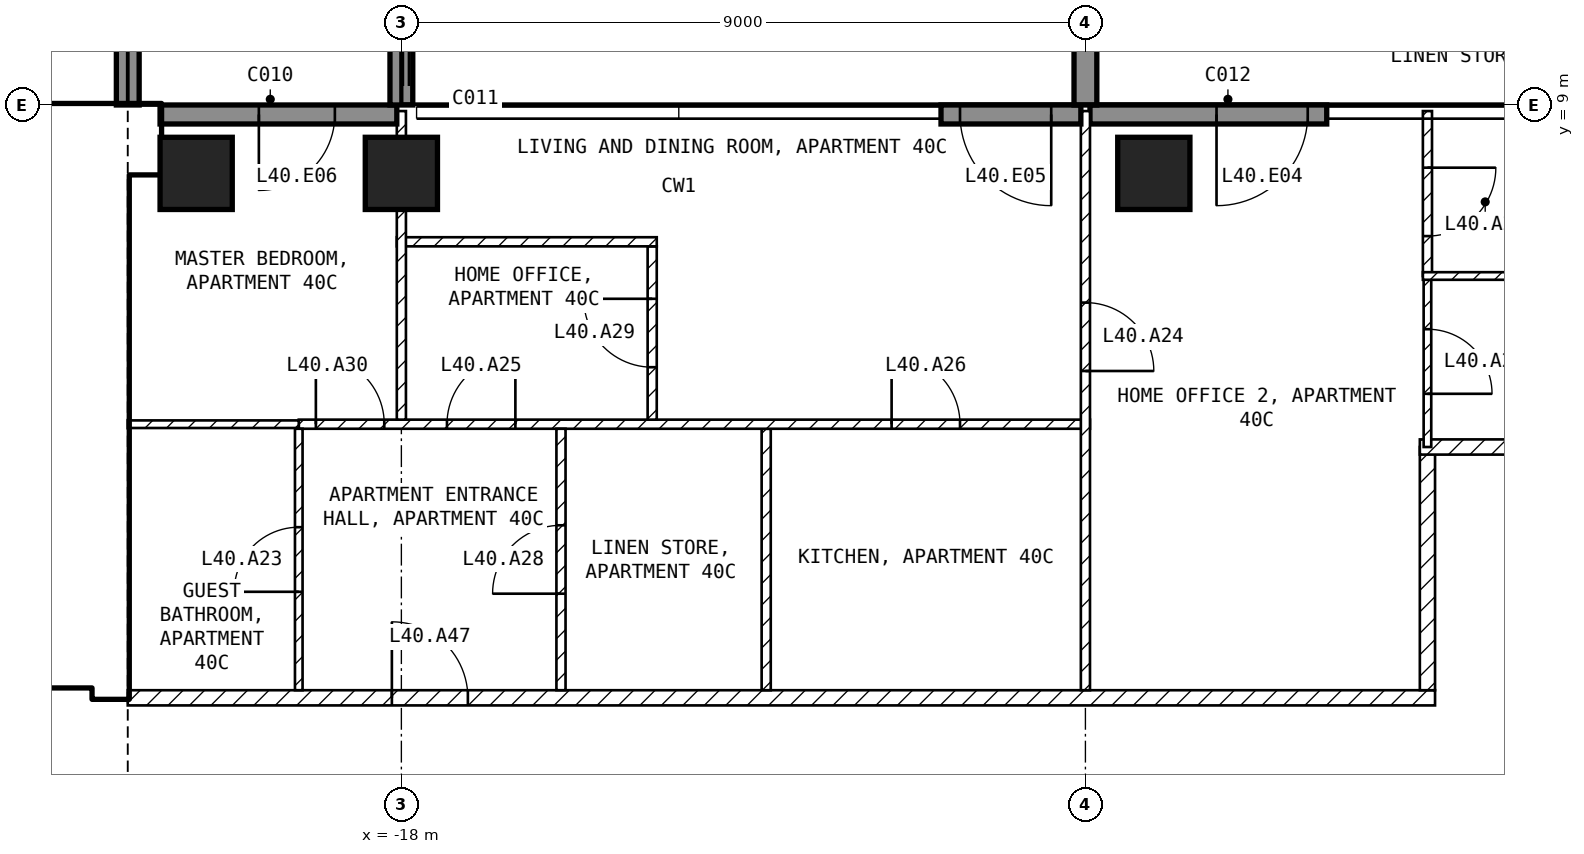
"""IFC4 building model, lengths in metres.
Left out: names, types, materials, properties, quantities, classifications, styles, units other than length and angle.
Written with IfcOpenShell. Run it as: python <this file> out.ifc"""

import sys

from ifc_helpers import new_model, si_unit, direction, frame, frame_2d, origin, origin_2d, place, context, subcontext, project, spatial, rectangle, extrude, element, fill, save


model = new_model("IFC4")
c1 = context("Model", 3, precision=1e-05, world=origin(), true_north=direction((0.0, 1.0)))
c2 = subcontext(c1, "Body", "Model", "MODEL_VIEW")
j1 = project(units=[si_unit("LENGTHUNIT", "METRE"), si_unit("PLANEANGLEUNIT", "RADIAN")], contexts=[c1])
p1 = place(None, origin())
s1 = spatial("IfcSite", under=j1, at=p1, CompositionType="ELEMENT")
p2 = place(p1, origin())
s2 = spatial("IfcBuilding", under=s1, at=p2, CompositionType="ELEMENT")
p3 = place(p2, frame((0.0, 0.0, 166.6)))
s3 = spatial("IfcBuildingStorey", under=s2, at=p3, CompositionType="ELEMENT", Elevation=166.6)
for number, where, z_axis, x_axis in (
    (1, (-20.7, 8.1, -0.25), (0.0, 0.0, 1.0), (1.0, 0.0, 0.0)),
    (2, (-18.0, 8.1, -0.25), (0.0, 0.0, 1.0), (1.0, 0.0, 0.0)),
    (3, (-8.1, 8.1, -0.25), (0.0, 0.0, 1.0), (1.0, 0.0, 0.0)),
):
    element("IfcColumn", number, at=place(p3, frame(where, z_axis=z_axis, x_axis=x_axis)), inside=s3, PredefinedType="COLUMN", context=c2, shape_type="SweptSolid", body=[
        extrude(rectangle(XDim=0.95, YDim=0.95, at=origin_2d()), origin(), (0.0, 0.0, 1.0), 3.5),
    ])
p4 = place(p3, frame((-5.825, 8.875, 0.0), z_axis=(0.0, 0.0, 1.0), x_axis=(-1.0, 0.0, 0.0)))
e4 = element("IfcWall", 4, at=p4, inside=s3, PredefinedType="SOLIDWALL", context=c2, shape_type="SweptSolid", body=[
    extrude(rectangle(XDim=3.115, YDim=0.25, at=frame_2d((1.558, 0.0))), origin(), (0.0, 0.0, 1.0), 3.25),
])
p5 = place(p4, frame((0.25, 0.0, 0.0)))
e5 = element("IfcOpeningElement", 5, at=p5, cuts=e4, PredefinedType="OPENING", context=c2, shape_type="SweptSolid", body=[
    extrude(rectangle(XDim=1.2, YDim=2.4, at=frame_2d((0.6, 1.2))), frame((0.0, 0.135, 0.0), z_axis=(0.0, -1.0, 0.0), x_axis=(1.0, 0.0, 0.0)), (0.0, 0.0, 1.0), 0.27),
])
p6 = place(p3, frame((-9.06, 8.875, 0.0), z_axis=(0.0, 0.0, 1.0), x_axis=(-1.0, 0.0, 0.0)))
e6 = element("IfcWall", 6, at=p6, inside=s3, PredefinedType="SOLIDWALL", context=c2, shape_type="SweptSolid", body=[
    extrude(rectangle(XDim=1.84, YDim=0.25, at=frame_2d((0.92, 0.0))), origin(), (0.0, 0.0, 1.0), 3.25),
])
p7 = place(p6, frame((0.39, 0.0, 0.0)))
e7 = element("IfcOpeningElement", 7, at=p7, cuts=e6, PredefinedType="OPENING", context=c2, shape_type="SweptSolid", body=[
    extrude(rectangle(XDim=1.2, YDim=2.4, at=frame_2d((0.6, 1.2))), frame((0.0, 0.135, 0.0), z_axis=(0.0, -1.0, 0.0), x_axis=(1.0, 0.0, 0.0)), (0.0, 0.0, 1.0), 0.27),
])
p8 = place(p3, frame((-18.06, 8.875, 0.0), z_axis=(0.0, 0.0, 1.0), x_axis=(-1.0, 0.0, 0.0)))
e8 = element("IfcWall", 8, at=p8, inside=s3, PredefinedType="SOLIDWALL", context=c2, shape_type="SweptSolid", body=[
    extrude(rectangle(XDim=3.115, YDim=0.25, at=frame_2d((1.558, 0.0))), origin(), (0.0, 0.0, 1.0), 3.25),
])
p9 = place(p8, frame((0.815, 0.0, 0.0)))
e9 = element("IfcOpeningElement", 9, at=p9, cuts=e8, PredefinedType="OPENING", context=c2, shape_type="SweptSolid", body=[
    extrude(rectangle(XDim=1.0, YDim=2.4, at=frame_2d((0.5, 1.2))), frame((0.0, 0.135, 0.0), z_axis=(0.0, -1.0, 0.0), x_axis=(1.0, 0.0, 0.0)), (0.0, 0.0, 1.0), 0.27),
])
for number, where, z_axis, x_axis in (
    (10, (-21.6, 9.0, 0.0), (0.0, 0.0, 1.0), (0.0, 1.0, 0.0)),
    (11, (-18.0, 9.0, 0.0), (0.0, 0.0, 1.0), (0.0, 1.0, 0.0)),
    (12, (-9.0, 9.0, 0.0), (0.0, 0.0, 1.0), (0.0, 1.0, 0.0)),
):
    element("IfcWall", number, at=place(p3, frame(where, z_axis=z_axis, x_axis=x_axis)), inside=s3, PredefinedType="SOLIDWALL", context=c2, shape_type="SweptSolid", body=[
        extrude(rectangle(XDim=2.7, YDim=0.3, at=frame_2d((1.35, 0.0))), origin(), (0.0, 0.0, 1.0), 3.25),
    ])
p10 = place(p3, frame((-29.6, 8.55, 0.0), z_axis=(0.0, 0.0, 1.0), x_axis=(1.0, 0.0, 0.0)))
e13 = element("IfcWall", 13, at=p10, inside=s3, PredefinedType="SHEAR", context=c2, shape_type="SweptSolid", body=[
    extrude(rectangle(XDim=8.425, YDim=0.9, at=frame_2d((4.212, 0.0))), origin(), (0.0, 0.0, 1.0), 3.25),
])
p11 = place(p3, frame((-21.825, 1.2, 0.0), z_axis=(0.0, 0.0, 1.0), x_axis=(0.0, 1.0, 0.0)))
e14 = element("IfcWall", 14, at=p11, inside=s3, PredefinedType="SHEAR", context=c2, shape_type="SweptSolid", body=[
    extrude(rectangle(XDim=6.9, YDim=0.45, at=frame_2d((3.45, 0.0))), origin(), (0.0, 0.0, 1.0), 3.25),
])
p12 = place(p3, frame((-33.2, 1.45, 0.0), z_axis=(0.0, 0.0, 1.0), x_axis=(1.0, 0.0, 0.0)))
e15 = element("IfcWall", 15, at=p12, inside=s3, PredefinedType="SOLIDWALL", context=c2, shape_type="SweptSolid", body=[
    extrude(rectangle(XDim=11.15, YDim=0.2, at=frame_2d((5.575, 0.0))), origin(), (0.0, 0.0, 1.0), 3.25),
])
p13 = place(p12, frame((9.4, 0.0, 0.0)))
e16 = element("IfcOpeningElement", 16, at=p13, cuts=e15, PredefinedType="OPENING", context=c2, shape_type="SweptSolid", body=[
    extrude(rectangle(XDim=1.0, YDim=2.1, at=frame_2d((0.5, 1.05))), frame((0.0, 0.11, 0.0), z_axis=(0.0, -1.0, 0.0), x_axis=(1.0, 0.0, 0.0)), (0.0, 0.0, 1.0), 0.22),
])
p14 = place(p12, frame((6.9, 0.0, 0.0)))
e17 = element("IfcOpeningElement", 17, at=p14, cuts=e15, PredefinedType="OPENING", context=c2, shape_type="SweptSolid", body=[
    extrude(rectangle(XDim=1.0, YDim=2.1, at=frame_2d((0.5, 1.05))), frame((0.0, 0.11, 0.0), z_axis=(0.0, -1.0, 0.0), x_axis=(1.0, 0.0, 0.0)), (0.0, 0.0, 1.0), 0.22),
])
p15 = place(p12, frame((1.1, 0.0, 0.0)))
e18 = element("IfcOpeningElement", 18, at=p15, cuts=e15, PredefinedType="OPENING", context=c2, shape_type="SweptSolid", body=[
    extrude(rectangle(XDim=0.9, YDim=2.1, at=frame_2d((0.45, 1.05))), frame((0.0, 0.11, 0.0), z_axis=(0.0, -1.0, 0.0), x_axis=(1.0, 0.0, 0.0)), (0.0, 0.0, 1.0), 0.22),
])
p16 = place(p3, frame((-28.35, 5.15, 0.0), z_axis=(0.0, 0.0, 1.0), x_axis=(1.0, 0.0, 0.0)))
e19 = element("IfcWall", 19, at=p16, inside=s3, PredefinedType="SOLIDWALL", context=c2, shape_type="SweptSolid", body=[
    extrude(rectangle(XDim=6.3, YDim=0.2, at=frame_2d((3.15, 0.0))), origin(), (0.0, 0.0, 1.0), 3.25),
])
p17 = place(p16, frame((5.1, 0.0, 0.0)))
e20 = element("IfcOpeningElement", 20, at=p17, cuts=e19, PredefinedType="OPENING", context=c2, shape_type="SweptSolid", body=[
    extrude(rectangle(XDim=1.0, YDim=2.1, at=frame_2d((0.5, 1.05))), frame((0.0, 0.11, 0.0), z_axis=(0.0, -1.0, 0.0), x_axis=(1.0, 0.0, 0.0)), (0.0, 0.0, 1.0), 0.22),
])
p18 = place(p3, frame((-21.6, 1.2, 0.0), z_axis=(0.0, 0.0, 1.0), x_axis=(1.0, 0.0, 0.0)))
e21 = element("IfcWall", 21, at=p18, inside=s3, PredefinedType="PARTITIONING", context=c2, shape_type="SweptSolid", body=[
    extrude(rectangle(XDim=17.2, YDim=0.2, at=frame_2d((8.6, 0.0))), origin(), (0.0, 0.0, 1.0), 3.25),
])
p19 = place(p18, frame((3.475, 0.0, 0.0)))
e22 = element("IfcOpeningElement", 22, at=p19, cuts=e21, PredefinedType="OPENING", context=c2, shape_type="SweptSolid", body=[
    extrude(rectangle(XDim=1.0, YDim=2.1, at=frame_2d((0.5, 1.05))), frame((0.0, 0.11, 0.0), z_axis=(0.0, -1.0, 0.0), x_axis=(1.0, 0.0, 0.0)), (0.0, 0.0, 1.0), 0.22),
])
p20 = place(p3, frame((-4.5, 1.3, 0.0), z_axis=(0.0, 0.0, 1.0), x_axis=(0.0, 1.0, 0.0)))
e23 = element("IfcWall", 23, at=p20, inside=s3, PredefinedType="PARTITIONING", context=c2, shape_type="SweptSolid", body=[
    extrude(rectangle(XDim=3.2, YDim=0.2, at=frame_2d((1.6, 0.0))), origin(), (0.0, 0.0, 1.0), 3.25),
])
p21 = place(p3, frame((-4.6, 4.5, 0.0), z_axis=(0.0, 0.0, 1.0), x_axis=(1.0, 0.0, 0.0)))
e24 = element("IfcWall", 24, at=p21, inside=s3, PredefinedType="PARTITIONING", context=c2, shape_type="SweptSolid", body=[
    extrude(rectangle(XDim=3.5, YDim=0.2, at=frame_2d((1.75, 0.0))), origin(), (0.0, 0.0, 1.0), 3.25),
])
p22 = place(p3, frame((-13.2, 1.3, 0.0), z_axis=(0.0, 0.0, 1.0), x_axis=(0.0, 1.0, 0.0)))
e25 = element("IfcWall", 25, at=p22, inside=s3, PredefinedType="PARTITIONING", context=c2, shape_type="SweptSolid", body=[
    extrude(rectangle(XDim=3.44, YDim=0.12, at=frame_2d((1.72, 0.0))), origin(), (0.0, 0.0, 1.0), 3.25),
])
p23 = place(p3, frame((-19.35, 4.8, 0.0), z_axis=(0.0, 0.0, 1.0), x_axis=(1.0, 0.0, 0.0)))
e26 = element("IfcWall", 26, at=p23, inside=s3, PredefinedType="PARTITIONING", context=c2, shape_type="SweptSolid", body=[
    extrude(rectangle(XDim=10.41, YDim=0.12, at=frame_2d((5.205, 0.0))), origin(), (0.0, 0.0, 1.0), 3.25),
])
p24 = place(p23, frame((1.95, 0.0, 0.0)))
e27 = element("IfcOpeningElement", 27, at=p24, cuts=e26, PredefinedType="OPENING", context=c2, shape_type="SweptSolid", body=[
    extrude(rectangle(XDim=0.9, YDim=2.1, at=frame_2d((0.45, 1.05))), frame((0.0, 0.07, 0.0), z_axis=(0.0, -1.0, 0.0), x_axis=(1.0, 0.0, 0.0)), (0.0, 0.0, 1.0), 0.14),
])
p25 = place(p23, frame((7.8, 0.0, 0.0)))
e28 = element("IfcOpeningElement", 28, at=p25, cuts=e26, PredefinedType="OPENING", context=c2, shape_type="SweptSolid", body=[
    extrude(rectangle(XDim=0.9, YDim=2.1, at=frame_2d((0.45, 1.05))), frame((0.0, 0.07, 0.0), z_axis=(0.0, -1.0, 0.0), x_axis=(1.0, 0.0, 0.0)), (0.0, 0.0, 1.0), 0.14),
])
p26 = place(p23, frame((0.225, 0.0, 0.0)))
e29 = element("IfcOpeningElement", 29, at=p26, cuts=e26, PredefinedType="OPENING", context=c2, shape_type="SweptSolid", body=[
    extrude(rectangle(XDim=0.9, YDim=2.1, at=frame_2d((0.45, 1.05))), frame((0.0, 0.07, 0.0), z_axis=(0.0, -1.0, 0.0), x_axis=(1.0, 0.0, 0.0)), (0.0, 0.0, 1.0), 0.14),
])
p27 = place(p3, frame((-9.0, 8.92, 0.0), z_axis=(0.0, 0.0, 1.0), x_axis=(0.0, -1.0, 0.0)))
e30 = element("IfcWall", 30, at=p27, inside=s3, PredefinedType="PARTITIONING", context=c2, shape_type="SweptSolid", body=[
    extrude(rectangle(XDim=7.62, YDim=0.12, at=frame_2d((3.81, 0.0))), origin(), (0.0, 0.0, 1.0), 3.25),
])
p28 = place(p27, frame((2.52, 0.0, 0.0)))
e31 = element("IfcOpeningElement", 31, at=p28, cuts=e30, PredefinedType="OPENING", context=c2, shape_type="SweptSolid", body=[
    extrude(rectangle(XDim=0.9, YDim=2.1, at=frame_2d((0.45, 1.05))), frame((0.0, 0.07, 0.0), z_axis=(0.0, -1.0, 0.0), x_axis=(1.0, 0.0, 0.0)), (0.0, 0.0, 1.0), 0.14),
])
p29 = place(p3, frame((-15.9, 1.3, 0.0), z_axis=(0.0, 0.0, 1.0), x_axis=(0.0, 1.0, 0.0)))
e32 = element("IfcWall", 32, at=p29, inside=s3, PredefinedType="PARTITIONING", context=c2, shape_type="SweptSolid", body=[
    extrude(rectangle(XDim=3.44, YDim=0.12, at=frame_2d((1.72, 0.0))), origin(), (0.0, 0.0, 1.0), 3.25),
])
p30 = place(p29, frame((1.27, 0.0, 0.0)))
e33 = element("IfcOpeningElement", 33, at=p30, cuts=e32, PredefinedType="OPENING", context=c2, shape_type="SweptSolid", body=[
    extrude(rectangle(XDim=0.9, YDim=2.1, at=frame_2d((0.45, 1.05))), frame((0.0, 0.07, 0.0), z_axis=(0.0, -1.0, 0.0), x_axis=(1.0, 0.0, 0.0)), (0.0, 0.0, 1.0), 0.14),
])
p31 = place(p3, frame((-19.35, 1.3, 0.0), z_axis=(0.0, 0.0, 1.0), x_axis=(0.0, 1.0, 0.0)))
e34 = element("IfcWall", 34, at=p31, inside=s3, PredefinedType="PARTITIONING", context=c2, shape_type="SweptSolid", body=[
    extrude(rectangle(XDim=3.44, YDim=0.1, at=frame_2d((1.72, 0.0))), origin(), (0.0, 0.0, 1.0), 3.25),
])
p32 = place(p31, frame((1.295, 0.0, 0.0)))
e35 = element("IfcOpeningElement", 35, at=p32, cuts=e34, PredefinedType="OPENING", context=c2, shape_type="SweptSolid", body=[
    extrude(rectangle(XDim=0.85, YDim=2.1, at=frame_2d((0.425, 1.05))), frame((0.0, 0.06, 0.0), z_axis=(0.0, -1.0, 0.0), x_axis=(1.0, 0.0, 0.0)), (0.0, 0.0, 1.0), 0.12),
])
p33 = place(p3, frame((-21.6, 4.8, 0.0), z_axis=(0.0, 0.0, 1.0), x_axis=(1.0, 0.0, 0.0)))
e36 = element("IfcWall", 36, at=p33, inside=s3, PredefinedType="PARTITIONING", context=c2, shape_type="SweptSolid", body=[
    extrude(rectangle(XDim=2.25, YDim=0.1, at=frame_2d((1.125, 0.0))), origin(), (0.0, 0.0, 1.0), 3.25),
])
p34 = place(p3, frame((-14.7, 4.86, 0.0), z_axis=(0.0, 0.0, 1.0), x_axis=(0.0, 1.0, 0.0)))
e37 = element("IfcWall", 37, at=p34, inside=s3, PredefinedType="PARTITIONING", context=c2, shape_type="SweptSolid", body=[
    extrude(rectangle(XDim=2.28, YDim=0.12, at=frame_2d((1.14, 0.0))), origin(), (0.0, 0.0, 1.0), 3.25),
])
p35 = place(p34, frame((0.69, 0.0, 0.0)))
e38 = element("IfcOpeningElement", 38, at=p35, cuts=e37, PredefinedType="OPENING", context=c2, shape_type="SweptSolid", body=[
    extrude(rectangle(XDim=0.9, YDim=2.1, at=frame_2d((0.45, 1.05))), frame((0.0, 0.07, 0.0), z_axis=(0.0, -1.0, 0.0), x_axis=(1.0, 0.0, 0.0)), (0.0, 0.0, 1.0), 0.14),
])
p36 = place(p3, frame((-14.64, 7.2, 0.0), z_axis=(0.0, 0.0, 1.0), x_axis=(-1.0, 0.0, 0.0)))
e39 = element("IfcWall", 39, at=p36, inside=s3, PredefinedType="PARTITIONING", context=c2, shape_type="SweptSolid", body=[
    extrude(rectangle(XDim=3.42, YDim=0.12, at=frame_2d((1.71, 0.0))), origin(), (0.0, 0.0, 1.0), 3.25),
])
p37 = place(p3, frame((-18.0, 4.86, 0.0), z_axis=(0.0, 0.0, 1.0), x_axis=(0.0, 1.0, 0.0)))
e40 = element("IfcWall", 40, at=p37, inside=s3, PredefinedType="PARTITIONING", context=c2, shape_type="SweptSolid", body=[
    extrude(rectangle(XDim=4.06, YDim=0.12, at=frame_2d((2.03, 0.0))), origin(), (0.0, 0.0, 1.0), 2.48),
])
p38 = place(p3, frame((-4.5, 6.75, 0.0), z_axis=(0.0, 0.0, 1.0), x_axis=(0.0, -1.0, 0.0)))
e41 = element("IfcWall", 41, at=p38, inside=s3, PredefinedType="PARTITIONING", context=c2, shape_type="SweptSolid", body=[
    extrude(rectangle(XDim=2.25, YDim=0.1, at=frame_2d((1.125, 0.0))), origin(), (0.0, 0.0, 1.0), 3.25),
])
p39 = place(p38, frame((0.7, 0.0, 0.0)))
e42 = element("IfcOpeningElement", 42, at=p39, cuts=e41, PredefinedType="OPENING", context=c2, shape_type="SweptSolid", body=[
    extrude(rectangle(XDim=0.85, YDim=2.1, at=frame_2d((0.425, 1.05))), frame((0.0, 0.06, 0.0), z_axis=(0.0, -1.0, 0.0), x_axis=(1.0, 0.0, 0.0)), (0.0, 0.0, 1.0), 0.12),
])
p40 = place(p3, frame((-4.5, 8.92, 0.0), z_axis=(0.0, 0.0, 1.0), x_axis=(0.0, -1.0, 0.0)))
e43 = element("IfcWall", 43, at=p40, inside=s3, PredefinedType="PARTITIONING", context=c2, shape_type="SweptSolid", body=[
    extrude(rectangle(XDim=2.17, YDim=0.12, at=frame_2d((1.085, 0.0))), origin(), (0.0, 0.0, 1.0), 3.25),
])
p41 = place(p40, frame((0.745, 0.0, 0.0)))
e44 = element("IfcOpeningElement", 44, at=p41, cuts=e43, PredefinedType="OPENING", context=c2, shape_type="SweptSolid", body=[
    extrude(rectangle(XDim=0.9, YDim=2.1, at=frame_2d((0.45, 1.05))), frame((0.0, 0.07, 0.0), z_axis=(0.0, -1.0, 0.0), x_axis=(1.0, 0.0, 0.0)), (0.0, 0.0, 1.0), 0.14),
])
p42 = place(p3, frame((-4.56, 6.75, 0.0), z_axis=(0.0, 0.0, 1.0), x_axis=(1.0, 0.0, 0.0)))
e45 = element("IfcWall", 45, at=p42, inside=s3, PredefinedType="PARTITIONING", context=c2, shape_type="SweptSolid", body=[
    extrude(rectangle(XDim=3.46, YDim=0.1, at=frame_2d((1.73, 0.0))), origin(), (0.0, 0.0, 1.0), 3.25),
])
p43 = place(p5, origin())
e46 = element("IfcDoor", 46, at=p43, inside=s3, OperationType="SINGLE_SWING_RIGHT", PredefinedType="DOOR", context=c2, shape_type="SweptSolid", body=[
    extrude(rectangle(XDim=1.2, YDim=2.4, at=frame_2d((0.6, 1.2))), frame((0.0, 0.025, 0.0), z_axis=(0.0, -1.0, 0.0), x_axis=(1.0, 0.0, 0.0)), (0.0, 0.0, 1.0), 0.05),
])
fill(e5, e46)
p44 = place(p7, origin())
e47 = element("IfcDoor", 47, at=p44, inside=s3, OperationType="SINGLE_SWING_LEFT", PredefinedType="DOOR", context=c2, shape_type="SweptSolid", body=[
    extrude(rectangle(XDim=1.2, YDim=2.4, at=frame_2d((0.6, 1.2))), frame((0.0, 0.025, 0.0), z_axis=(0.0, -1.0, 0.0), x_axis=(1.0, 0.0, 0.0)), (0.0, 0.0, 1.0), 0.05),
])
fill(e7, e47)
p45 = place(p9, origin())
e48 = element("IfcDoor", 48, at=p45, inside=s3, OperationType="SINGLE_SWING_RIGHT", PredefinedType="DOOR", context=c2, shape_type="SweptSolid", body=[
    extrude(rectangle(XDim=1.0, YDim=2.4, at=frame_2d((0.5, 1.2))), frame((0.0, 0.025, 0.0), z_axis=(0.0, -1.0, 0.0), x_axis=(1.0, 0.0, 0.0)), (0.0, 0.0, 1.0), 0.05),
])
fill(e9, e48)
p46 = place(p17, origin())
e49 = element("IfcDoor", 49, at=p46, inside=s3, OperationType="SINGLE_SWING_LEFT", PredefinedType="DOOR", context=c2, shape_type="SweptSolid", body=[
    extrude(rectangle(XDim=1.0, YDim=2.1, at=frame_2d((0.5, 1.05))), frame((0.0, 0.025, 0.0), z_axis=(0.0, -1.0, 0.0), x_axis=(1.0, 0.0, 0.0)), (0.0, 0.0, 1.0), 0.05),
])
fill(e20, e49)
p47 = place(p39, origin())
e50 = element("IfcDoor", 50, at=p47, inside=s3, OperationType="SINGLE_SWING_RIGHT", PredefinedType="DOOR", context=c2, shape_type="SweptSolid", body=[
    extrude(rectangle(XDim=0.85, YDim=2.1, at=frame_2d((0.425, 1.05))), frame((0.0, 0.025, 0.0), z_axis=(0.0, -1.0, 0.0), x_axis=(1.0, 0.0, 0.0)), (0.0, 0.0, 1.0), 0.05),
])
fill(e42, e50)
p48 = place(p32, origin())
e51 = element("IfcDoor", 51, at=p48, inside=s3, OperationType="SINGLE_SWING_LEFT", PredefinedType="DOOR", context=c2, shape_type="SweptSolid", body=[
    extrude(rectangle(XDim=0.85, YDim=2.1, at=frame_2d((0.425, 1.05))), frame((0.0, 0.025, 0.0), z_axis=(0.0, -1.0, 0.0), x_axis=(1.0, 0.0, 0.0)), (0.0, 0.0, 1.0), 0.05),
])
fill(e35, e51)
p49 = place(p28, origin())
e52 = element("IfcDoor", 52, at=p49, inside=s3, OperationType="SINGLE_SWING_RIGHT", PredefinedType="DOOR", context=c2, shape_type="SweptSolid", body=[
    extrude(rectangle(XDim=0.9, YDim=2.1, at=frame_2d((0.45, 1.05))), frame((0.0, 0.025, 0.0), z_axis=(0.0, -1.0, 0.0), x_axis=(1.0, 0.0, 0.0)), (0.0, 0.0, 1.0), 0.05),
])
fill(e31, e52)
p50 = place(p24, origin())
e53 = element("IfcDoor", 53, at=p50, inside=s3, OperationType="SINGLE_SWING_RIGHT", PredefinedType="DOOR", context=c2, shape_type="SweptSolid", body=[
    extrude(rectangle(XDim=0.9, YDim=2.1, at=frame_2d((0.45, 1.05))), frame((0.0, 0.025, 0.0), z_axis=(0.0, -1.0, 0.0), x_axis=(1.0, 0.0, 0.0)), (0.0, 0.0, 1.0), 0.05),
])
fill(e27, e53)
p51 = place(p25, origin())
e54 = element("IfcDoor", 54, at=p51, inside=s3, OperationType="SINGLE_SWING_LEFT", PredefinedType="DOOR", context=c2, shape_type="SweptSolid", body=[
    extrude(rectangle(XDim=0.9, YDim=2.1, at=frame_2d((0.45, 1.05))), frame((0.0, 0.025, 0.0), z_axis=(0.0, -1.0, 0.0), x_axis=(1.0, 0.0, 0.0)), (0.0, 0.0, 1.0), 0.05),
])
fill(e28, e54)
p52 = place(p41, origin())
e55 = element("IfcDoor", 55, at=p52, inside=s3, OperationType="SINGLE_SWING_LEFT", PredefinedType="DOOR", context=c2, shape_type="SweptSolid", body=[
    extrude(rectangle(XDim=0.9, YDim=2.1, at=frame_2d((0.45, 1.05))), frame((0.0, 0.025, 0.0), z_axis=(0.0, -1.0, 0.0), x_axis=(1.0, 0.0, 0.0)), (0.0, 0.0, 1.0), 0.05),
])
fill(e44, e55)
p53 = place(p30, origin())
e56 = element("IfcDoor", 56, at=p53, inside=s3, OperationType="SINGLE_SWING_LEFT", PredefinedType="DOOR", context=c2, shape_type="SweptSolid", body=[
    extrude(rectangle(XDim=0.9, YDim=2.1, at=frame_2d((0.45, 1.05))), frame((0.0, 0.025, 0.0), z_axis=(0.0, -1.0, 0.0), x_axis=(1.0, 0.0, 0.0)), (0.0, 0.0, 1.0), 0.05),
])
fill(e33, e56)
p54 = place(p35, origin())
e57 = element("IfcDoor", 57, at=p54, inside=s3, OperationType="SINGLE_SWING_RIGHT", PredefinedType="DOOR", context=c2, shape_type="SweptSolid", body=[
    extrude(rectangle(XDim=0.9, YDim=2.1, at=frame_2d((0.45, 1.05))), frame((0.0, 0.025, 0.0), z_axis=(0.0, -1.0, 0.0), x_axis=(1.0, 0.0, 0.0)), (0.0, 0.0, 1.0), 0.05),
])
fill(e38, e57)
p55 = place(p26, origin())
e58 = element("IfcDoor", 58, at=p55, inside=s3, OperationType="SINGLE_SWING_LEFT", PredefinedType="DOOR", context=c2, shape_type="SweptSolid", body=[
    extrude(rectangle(XDim=0.9, YDim=2.1, at=frame_2d((0.45, 1.05))), frame((0.0, 0.025, 0.0), z_axis=(0.0, -1.0, 0.0), x_axis=(1.0, 0.0, 0.0)), (0.0, 0.0, 1.0), 0.05),
])
fill(e29, e58)
p56 = place(p19, origin())
e59 = element("IfcDoor", 59, at=p56, inside=s3, OperationType="SINGLE_SWING_LEFT", PredefinedType="DOOR", context=c2, shape_type="SweptSolid", body=[
    extrude(rectangle(XDim=1.0, YDim=2.1, at=frame_2d((0.5, 1.05))), frame((0.0, 0.025, 0.0), z_axis=(0.0, -1.0, 0.0), x_axis=(1.0, 0.0, 0.0)), (0.0, 0.0, 1.0), 0.05),
])
fill(e22, e59)
save(model, sys.argv[1])
